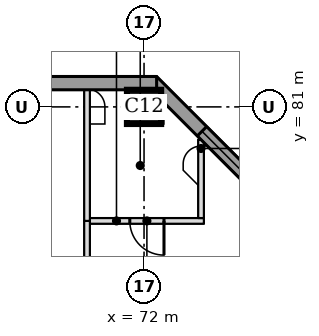
"""IFC4 building model, lengths in metres.
Left out: names, types, materials, properties, quantities, classifications, styles, units other than length and angle.
Written with IfcOpenShell. Run it as: python <this file> out.ifc"""

import sys

from ifc_helpers import new_model, si_unit, direction, frame, frame_2d, origin, origin_2d, place, context, subcontext, project, spatial, rectangle, extrude, element, fill, save


model = new_model("IFC4")
c1 = context("Model", 3, precision=1e-05, world=origin(), true_north=direction((0.0, 1.0)))
c2 = subcontext(c1, "Body", "Model", "MODEL_VIEW")
j1 = project(units=[si_unit("LENGTHUNIT", "METRE"), si_unit("PLANEANGLEUNIT", "RADIAN")], contexts=[c1])
p1 = place(None, origin())
s1 = spatial("IfcSite", under=j1, at=p1, CompositionType="ELEMENT")
p2 = place(p1, origin())
s2 = spatial("IfcBuilding", under=s1, at=p2, CompositionType="ELEMENT")
p3 = place(p2, frame((0.0, 0.0, 147.7)))
s3 = spatial("IfcBuildingStorey", under=s2, at=p3, CompositionType="ELEMENT", Elevation=147.7)
p4 = place(p3, frame((72.0, 81.0, 0.0), z_axis=(0.0, 0.0, 1.0), x_axis=(1.0, 0.0, 0.0)))
e1 = element("IfcColumn", 1, at=p4, inside=s3, PredefinedType="COLUMN", context=c2, shape_type="SweptSolid", body=[
    extrude(rectangle(XDim=0.9, YDim=0.9, at=origin_2d()), origin(), (0.0, 0.0, 1.0), 3.7),
])
p5 = place(p3, frame((77.176, 76.708, 0.0), z_axis=(0.0, 0.0, 1.0), x_axis=(-0.707106781187, 0.707106781187, 0.0)))
e2 = element("IfcWall", 2, at=p5, inside=s3, PredefinedType="STANDARD", context=c2, shape_type="SweptSolid", body=[
    extrude(rectangle(XDim=7.027, YDim=0.35, at=frame_2d((3.513, 0.0))), origin(), (0.0, 0.0, 1.0), 3.525),
])
p6 = place(p5, frame((1.863, 0.0, 0.9)))
e3 = element("IfcOpeningElement", 3, at=p6, cuts=e2, PredefinedType="OPENING", context=c2, shape_type="SweptSolid", body=[
    extrude(rectangle(XDim=3.3, YDim=1.9, at=frame_2d((1.65, 0.95))), frame((0.0, 0.185, 0.0), z_axis=(0.0, -1.0, 0.0), x_axis=(1.0, 0.0, 0.0)), (0.0, 0.0, 1.0), 0.37),
])
p7 = place(p3, frame((72.331, 81.625, 0.0), z_axis=(0.0, 0.0, 1.0), x_axis=(-1.0, 0.0, 0.0)))
e4 = element("IfcWall", 4, at=p7, inside=s3, PredefinedType="STANDARD", context=c2, shape_type="SweptSolid", body=[
    extrude(rectangle(XDim=32.163, YDim=0.35, at=frame_2d((16.081, 0.0))), origin(), (0.0, 0.0, 1.0), 3.525),
])
p8 = place(p7, frame((5.431, 0.0, 0.9)))
e5 = element("IfcOpeningElement", 5, at=p8, cuts=e4, PredefinedType="OPENING", context=c2, shape_type="SweptSolid", body=[
    extrude(rectangle(XDim=3.3, YDim=1.9, at=frame_2d((1.65, 0.95))), frame((0.0, 0.185, 0.0), z_axis=(0.0, -1.0, 0.0), x_axis=(1.0, 0.0, 0.0)), (0.0, 0.0, 1.0), 0.37),
])
p9 = place(p7, frame((9.931, 0.0, 0.9)))
e6 = element("IfcOpeningElement", 6, at=p9, cuts=e4, PredefinedType="OPENING", context=c2, shape_type="SweptSolid", body=[
    extrude(rectangle(XDim=3.3, YDim=1.9, at=frame_2d((1.65, 0.95))), frame((0.0, 0.185, 0.0), z_axis=(0.0, -1.0, 0.0), x_axis=(1.0, 0.0, 0.0)), (0.0, 0.0, 1.0), 0.37),
])
p10 = place(p7, frame((14.431, 0.0, 0.9)))
e7 = element("IfcOpeningElement", 7, at=p10, cuts=e4, PredefinedType="OPENING", context=c2, shape_type="SweptSolid", body=[
    extrude(rectangle(XDim=3.3, YDim=1.9, at=frame_2d((1.65, 0.95))), frame((0.0, 0.185, 0.0), z_axis=(0.0, -1.0, 0.0), x_axis=(1.0, 0.0, 0.0)), (0.0, 0.0, 1.0), 0.37),
])
p11 = place(p7, frame((18.931, 0.0, 0.9)))
e8 = element("IfcOpeningElement", 8, at=p11, cuts=e4, PredefinedType="OPENING", context=c2, shape_type="SweptSolid", body=[
    extrude(rectangle(XDim=3.3, YDim=1.9, at=frame_2d((1.65, 0.95))), frame((0.0, 0.185, 0.0), z_axis=(0.0, -1.0, 0.0), x_axis=(1.0, 0.0, 0.0)), (0.0, 0.0, 1.0), 0.37),
])
p12 = place(p7, frame((23.431, 0.0, 0.9)))
e9 = element("IfcOpeningElement", 9, at=p12, cuts=e4, PredefinedType="OPENING", context=c2, shape_type="SweptSolid", body=[
    extrude(rectangle(XDim=3.3, YDim=1.9, at=frame_2d((1.65, 0.95))), frame((0.0, 0.185, 0.0), z_axis=(0.0, -1.0, 0.0), x_axis=(1.0, 0.0, 0.0)), (0.0, 0.0, 1.0), 0.37),
])
p13 = place(p3, frame((70.575, 78.0, 0.0), z_axis=(0.0, 0.0, 1.0), x_axis=(1.0, 0.0, 0.0)))
e10 = element("IfcWall", 10, at=p13, inside=s3, PredefinedType="PARTITIONING", context=c2, shape_type="SweptSolid", body=[
    extrude(rectangle(XDim=3.0, YDim=0.15, at=frame_2d((1.5, 0.0))), origin(), (0.0, 0.0, 1.0), 3.55),
])
p14 = place(p13, frame((1.05, 0.0, 0.0)))
e11 = element("IfcOpeningElement", 11, at=p14, cuts=e10, PredefinedType="OPENING", context=c2, shape_type="SweptSolid", body=[
    extrude(rectangle(XDim=0.9, YDim=2.1, at=frame_2d((0.45, 1.05))), frame((0.0, 0.085, 0.0), z_axis=(0.0, -1.0, 0.0), x_axis=(1.0, 0.0, 0.0)), (0.0, 0.0, 1.0), 0.17),
])
p15 = place(p3, frame((70.5, 45.0, 0.0), z_axis=(0.0, 0.0, 1.0), x_axis=(0.0, 1.0, 0.0)))
e12 = element("IfcWall", 12, at=p15, inside=s3, PredefinedType="PARTITIONING", context=c2, shape_type="SweptSolid", body=[
    extrude(rectangle(XDim=33.0, YDim=0.15, at=frame_2d((16.5, 0.0))), origin(), (0.0, 0.0, 1.0), 3.55),
])
p16 = place(p3, frame((70.5, 78.0, 0.0), z_axis=(0.0, 0.0, 1.0), x_axis=(0.0, 1.0, 0.0)))
e13 = element("IfcWall", 13, at=p16, inside=s3, PredefinedType="PARTITIONING", context=c2, shape_type="SweptSolid", body=[
    extrude(rectangle(XDim=3.45, YDim=0.15, at=frame_2d((1.725, 0.0))), origin(), (0.0, 0.0, 1.0), 3.55),
])
p17 = place(p3, frame((73.5, 78.075, 0.0), z_axis=(0.0, 0.0, 1.0), x_axis=(0.0, 1.0, 0.0)))
e14 = element("IfcWall", 14, at=p17, inside=s3, PredefinedType="PARTITIONING", context=c2, shape_type="SweptSolid", body=[
    extrude(rectangle(XDim=2.062, YDim=0.15, at=frame_2d((1.031, 0.0))), origin(), (0.0, 0.0, 1.0), 3.55),
])
p18 = place(p6, origin())
e15 = element("IfcWindow", 15, at=p18, inside=s3, PartitioningType="SINGLE_PANEL", PredefinedType="WINDOW", context=c2, shape_type="SweptSolid", body=[
    extrude(rectangle(XDim=3.3, YDim=1.9, at=frame_2d((1.65, 0.95))), frame((0.0, 0.085, 0.0), z_axis=(0.0, -1.0, 0.0), x_axis=(1.0, 0.0, 0.0)), (0.0, 0.0, 1.0), 0.06),
])
fill(e3, e15)
p19 = place(p14, frame((0.9, 0.0, 0.0), z_axis=(0.0, 0.0, 1.0), x_axis=(-1.0, 0.0, 0.0)))
e16 = element("IfcDoor", 16, at=p19, inside=s3, OperationType="SINGLE_SWING_LEFT", PredefinedType="DOOR", context=c2, shape_type="SweptSolid", body=[
    extrude(rectangle(XDim=0.9, YDim=2.1, at=frame_2d((0.45, 1.05))), frame((0.0, 0.025, 0.0), z_axis=(0.0, -1.0, 0.0), x_axis=(1.0, 0.0, 0.0)), (0.0, 0.0, 1.0), 0.05),
])
fill(e11, e16)
save(model, sys.argv[1])
